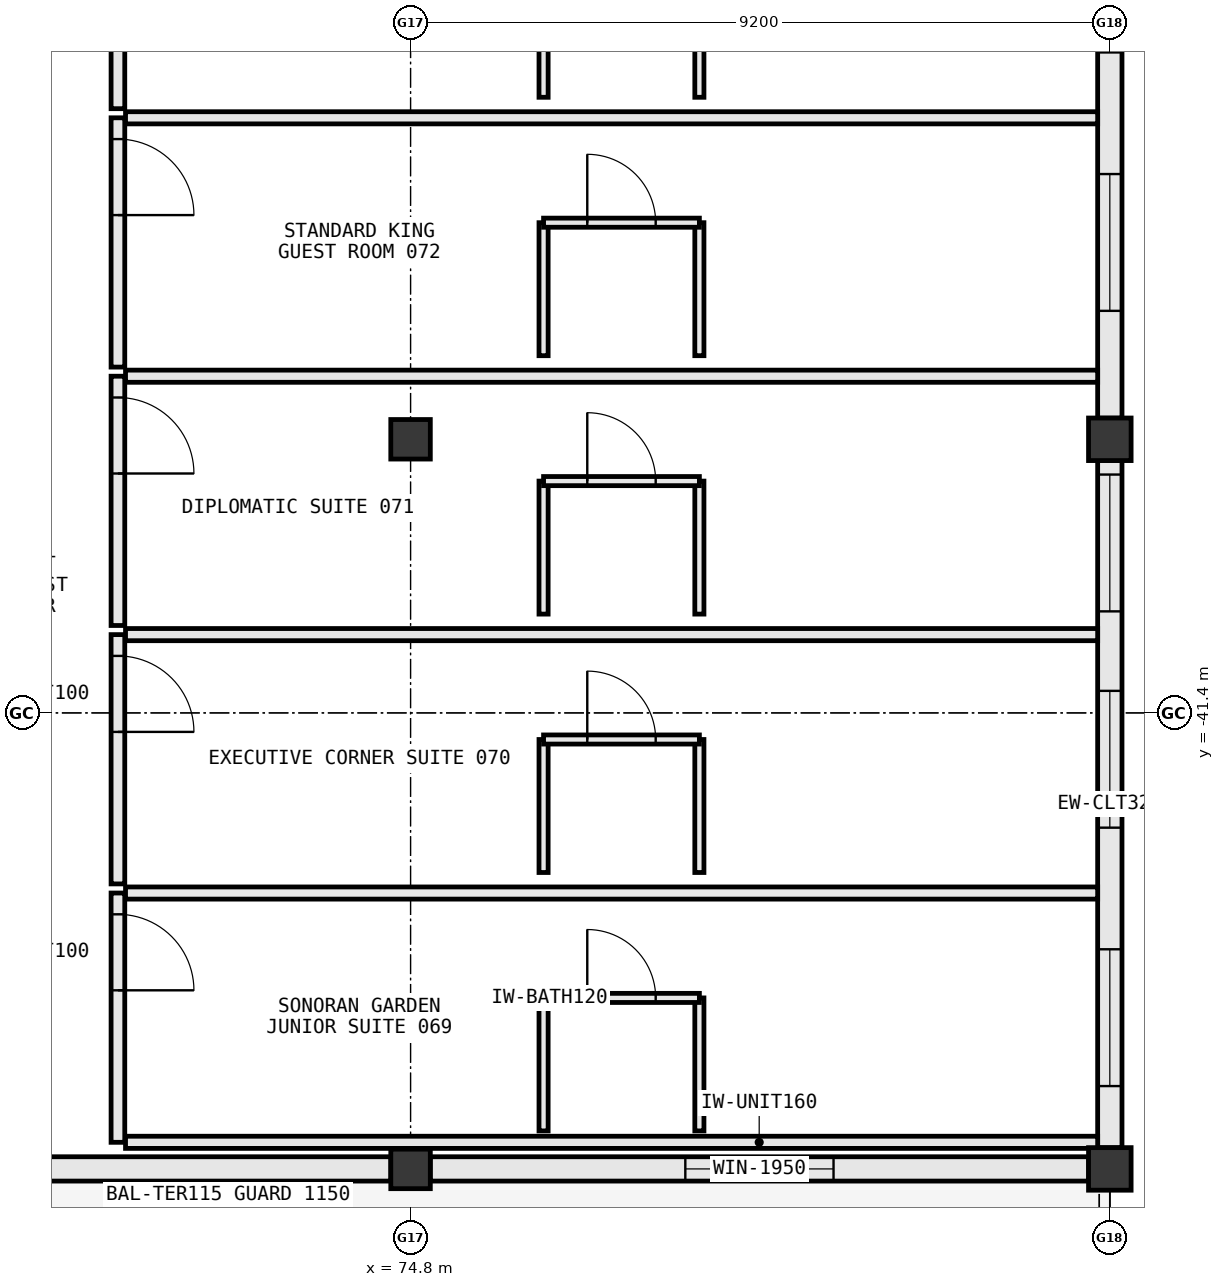
"""IFC4 building model, lengths in metres.
Left out: names, types, materials, properties, quantities, classifications, styles, units other than length and angle.
Written with IfcOpenShell. Run it as: python <this file> out.ifc"""

import sys

from ifc_helpers import new_model, si_unit, direction, frame, frame_2d, origin, origin_2d, place, context, subcontext, project, spatial, rectangle, extrude, element, fill, save


model = new_model("IFC4")
c1 = context("Model", 3, precision=1e-05, world=origin(), true_north=direction((0.0, 1.0)))
c2 = subcontext(c1, "Body", "Model", "MODEL_VIEW")
j1 = project(units=[si_unit("LENGTHUNIT", "METRE"), si_unit("PLANEANGLEUNIT", "RADIAN")], contexts=[c1])
p1 = place(None, origin())
s1 = spatial("IfcSite", under=j1, at=p1, CompositionType="ELEMENT")
p2 = place(p1, origin())
s2 = spatial("IfcBuilding", under=s1, at=p2, CompositionType="ELEMENT")
p3 = place(p2, frame((0.0, 0.0, 16.2)))
s3 = spatial("IfcBuildingStorey", under=s2, at=p3, CompositionType="ELEMENT", Elevation=16.2)
for number, where, z_axis, x_axis in (
    (1, (74.8, -47.4, 0.0), (0.0, 0.0, 1.0), (1.0, 0.0, 0.0)),
    (2, (74.8, -37.8, 0.0), (0.0, 0.0, 1.0), (1.0, 0.0, 0.0)),
):
    element("IfcColumn", number, at=place(p3, frame(where, z_axis=z_axis, x_axis=x_axis)), inside=s3, PredefinedType="COLUMN", context=c2, shape_type="SweptSolid", body=[
        extrude(rectangle(XDim=0.52, YDim=0.52, at=origin_2d()), origin(), (0.0, 0.0, 1.0), 3.8),
    ])
for number, where, z_axis, x_axis in (
    (3, (84.0, -47.4, 0.0), (0.0, 0.0, 1.0), (1.0, 0.0, 0.0)),
    (4, (84.0, -37.8, 0.0), (0.0, 0.0, 1.0), (1.0, 0.0, 0.0)),
):
    element("IfcColumn", number, at=place(p3, frame(where, z_axis=z_axis, x_axis=x_axis)), inside=s3, PredefinedType="COLUMN", context=c2, shape_type="SweptSolid", body=[
        extrude(rectangle(XDim=0.56, YDim=0.56, at=origin_2d()), origin(), (0.0, 0.0, 1.0), 3.8),
    ])
p4 = place(p3, frame((67.808, -47.4, 0.0), z_axis=(0.0, 0.0, 1.0), x_axis=(1.0, 0.0, 0.0)))
e5 = element("IfcWall", 5, at=p4, inside=s3, PredefinedType="STANDARD", context=c2, shape_type="SweptSolid", body=[
    extrude(rectangle(XDim=6.734, YDim=0.32, at=frame_2d((3.367, 0.0))), origin(), (0.0, 0.0, 1.0), 2.695),
])
p5 = place(p3, frame((75.058, -47.4, 0.0), z_axis=(0.0, 0.0, 1.0), x_axis=(1.0, 0.0, 0.0)))
e6 = element("IfcWall", 6, at=p5, inside=s3, PredefinedType="STANDARD", context=c2, shape_type="SweptSolid", body=[
    extrude(rectangle(XDim=8.664, YDim=0.32, at=frame_2d((4.332, 0.0))), origin(), (0.0, 0.0, 1.0), 2.915),
])
p6 = place(p5, frame((3.357, 0.0, 0.85)))
e7 = element("IfcOpeningElement", 7, at=p6, cuts=e6, PredefinedType="OPENING", context=c2, shape_type="SweptSolid", body=[
    extrude(rectangle(XDim=1.95, YDim=1.9, at=frame_2d((0.975, 0.95))), frame((0.0, 0.172, 0.0), z_axis=(0.0, -1.0, 0.0), x_axis=(1.0, 0.0, 0.0)), (0.0, 0.0, 1.0), 0.344),
])
p7 = place(p3, frame((84.0, -47.122, 0.0), z_axis=(0.0, 0.0, 1.0), x_axis=(0.0, 1.0, 0.0)))
e8 = element("IfcWall", 8, at=p7, inside=s3, PredefinedType="STANDARD", context=c2, shape_type="SweptSolid", body=[
    extrude(rectangle(XDim=9.044, YDim=0.32, at=frame_2d((4.522, 0.0))), origin(), (0.0, 0.0, 1.0), 2.975),
])
p8 = place(p7, frame((0.812, 0.0, 0.85)))
e9 = element("IfcOpeningElement", 9, at=p8, cuts=e8, PredefinedType="OPENING", context=c2, shape_type="SweptSolid", body=[
    extrude(rectangle(XDim=1.8, YDim=1.85, at=frame_2d((0.9, 0.925))), frame((0.0, 0.172, 0.0), z_axis=(0.0, -1.0, 0.0), x_axis=(1.0, 0.0, 0.0)), (0.0, 0.0, 1.0), 0.344),
])
p9 = place(p7, frame((4.212, 0.0, 0.85)))
e10 = element("IfcOpeningElement", 10, at=p9, cuts=e8, PredefinedType="OPENING", context=c2, shape_type="SweptSolid", body=[
    extrude(rectangle(XDim=1.8, YDim=1.85, at=frame_2d((0.9, 0.925))), frame((0.0, 0.172, 0.0), z_axis=(0.0, -1.0, 0.0), x_axis=(1.0, 0.0, 0.0)), (0.0, 0.0, 1.0), 0.344),
])
p10 = place(p7, frame((7.058, 0.0, 0.85)))
e11 = element("IfcOpeningElement", 11, at=p10, cuts=e8, PredefinedType="OPENING", context=c2, shape_type="SweptSolid", body=[
    extrude(rectangle(XDim=1.8, YDim=1.85, at=frame_2d((0.9, 0.925))), frame((0.0, 0.172, 0.0), z_axis=(0.0, -1.0, 0.0), x_axis=(1.0, 0.0, 0.0)), (0.0, 0.0, 1.0), 0.344),
])
p11 = place(p3, frame((84.0, -37.522, 0.0), z_axis=(0.0, 0.0, 1.0), x_axis=(0.0, 1.0, 0.0)))
e12 = element("IfcWall", 12, at=p11, inside=s3, PredefinedType="STANDARD", context=c2, shape_type="SweptSolid", body=[
    extrude(rectangle(XDim=9.044, YDim=0.32, at=frame_2d((4.522, 0.0))), origin(), (0.0, 0.0, 1.0), 2.975),
])
p12 = place(p11, frame((1.412, 0.0, 0.85)))
e13 = element("IfcOpeningElement", 13, at=p12, cuts=e12, PredefinedType="OPENING", context=c2, shape_type="SweptSolid", body=[
    extrude(rectangle(XDim=1.8, YDim=1.85, at=frame_2d((0.9, 0.925))), frame((0.0, 0.172, 0.0), z_axis=(0.0, -1.0, 0.0), x_axis=(1.0, 0.0, 0.0)), (0.0, 0.0, 1.0), 0.344),
])
p13 = place(p11, frame((4.812, 0.0, 0.85)))
e14 = element("IfcOpeningElement", 14, at=p13, cuts=e12, PredefinedType="OPENING", context=c2, shape_type="SweptSolid", body=[
    extrude(rectangle(XDim=1.8, YDim=1.85, at=frame_2d((0.9, 0.925))), frame((0.0, 0.172, 0.0), z_axis=(0.0, -1.0, 0.0), x_axis=(1.0, 0.0, 0.0)), (0.0, 0.0, 1.0), 0.344),
])
p14 = place(p11, frame((7.658, 0.0, 0.85)))
e15 = element("IfcOpeningElement", 15, at=p14, cuts=e12, PredefinedType="OPENING", context=c2, shape_type="SweptSolid", body=[
    extrude(rectangle(XDim=1.2, YDim=1.55, at=frame_2d((0.6, 0.775))), frame((0.0, 0.172, 0.0), z_axis=(0.0, -1.0, 0.0), x_axis=(1.0, 0.0, 0.0)), (0.0, 0.0, 1.0), 0.344),
])
p15 = place(p3, frame((70.95, -43.77, 0.0), z_axis=(0.0, 0.0, 1.0), x_axis=(0.0, -1.0, 0.0)))
e16 = element("IfcWall", 16, at=p15, inside=s3, PredefinedType="PARTITIONING", context=c2, shape_type="SweptSolid", body=[
    extrude(rectangle(XDim=3.28, YDim=0.18, at=frame_2d((1.64, 0.0))), origin(), (0.0, 0.0, 1.0), 3.56),
])
p16 = place(p15, frame((0.28, 0.0, 0.0)))
e17 = element("IfcOpeningElement", 17, at=p16, cuts=e16, PredefinedType="OPENING", context=c2, shape_type="SweptSolid", body=[
    extrude(rectangle(XDim=1.0, YDim=2.2, at=frame_2d((0.5, 1.1))), frame((0.0, 0.102, 0.0), z_axis=(0.0, -1.0, 0.0), x_axis=(1.0, 0.0, 0.0)), (0.0, 0.0, 1.0), 0.204),
])
p17 = place(p3, frame((71.05, -47.05, 0.0), z_axis=(0.0, 0.0, 1.0), x_axis=(1.0, 0.0, 0.0)))
e18 = element("IfcWall", 18, at=p17, inside=s3, PredefinedType="PARTITIONING", context=c2, shape_type="SweptSolid", body=[
    extrude(rectangle(XDim=12.79, YDim=0.16, at=frame_2d((6.395, 0.0))), origin(), (0.0, 0.0, 1.0), 2.695),
])
p18 = place(p3, frame((71.05, -43.77, 0.0), z_axis=(0.0, 0.0, 1.0), x_axis=(1.0, 0.0, 0.0)))
e19 = element("IfcWall", 19, at=p18, inside=s3, PredefinedType="PARTITIONING", context=c2, shape_type="SweptSolid", body=[
    extrude(rectangle(XDim=12.79, YDim=0.16, at=frame_2d((6.395, 0.0))), origin(), (0.0, 0.0, 1.0), 3.56),
])
for number, where, z_axis, x_axis in (
    (20, (76.55, -46.9, 0.0), (0.0, 0.0, 1.0), (0.0, 1.0, 0.0)),
    (21, (78.6, -46.9, 0.0), (0.0, 0.0, 1.0), (0.0, 1.0, 0.0)),
):
    element("IfcWall", number, at=place(p3, frame(where, z_axis=z_axis, x_axis=x_axis)), inside=s3, PredefinedType="PARTITIONING", context=c2, shape_type="SweptSolid", body=[
        extrude(rectangle(XDim=1.75, YDim=0.12, at=frame_2d((0.875, 0.0))), origin(), (0.0, 0.0, 1.0), 3.56),
    ])
p19 = place(p3, frame((76.55, -45.15, 0.0), z_axis=(0.0, 0.0, 1.0), x_axis=(1.0, 0.0, 0.0)))
e22 = element("IfcWall", 22, at=p19, inside=s3, PredefinedType="PARTITIONING", context=c2, shape_type="SweptSolid", body=[
    extrude(rectangle(XDim=2.05, YDim=0.12, at=frame_2d((1.025, 0.0))), origin(), (0.0, 0.0, 1.0), 3.56),
])
p20 = place(p19, frame((0.575, 0.0, 0.0)))
e23 = element("IfcOpeningElement", 23, at=p20, cuts=e22, PredefinedType="OPENING", context=c2, shape_type="SweptSolid", body=[
    extrude(rectangle(XDim=0.9, YDim=2.15, at=frame_2d((0.45, 1.075))), frame((0.0, 0.072, 0.0), z_axis=(0.0, -1.0, 0.0), x_axis=(1.0, 0.0, 0.0)), (0.0, 0.0, 1.0), 0.144),
])
p21 = place(p3, frame((70.95, -40.37, 0.0), z_axis=(0.0, 0.0, 1.0), x_axis=(0.0, -1.0, 0.0)))
e24 = element("IfcWall", 24, at=p21, inside=s3, PredefinedType="PARTITIONING", context=c2, shape_type="SweptSolid", body=[
    extrude(rectangle(XDim=3.28, YDim=0.18, at=frame_2d((1.64, 0.0))), origin(), (0.0, 0.0, 1.0), 3.56),
])
p22 = place(p21, frame((0.28, 0.0, 0.0)))
e25 = element("IfcOpeningElement", 25, at=p22, cuts=e24, PredefinedType="OPENING", context=c2, shape_type="SweptSolid", body=[
    extrude(rectangle(XDim=1.0, YDim=2.2, at=frame_2d((0.5, 1.1))), frame((0.0, 0.102, 0.0), z_axis=(0.0, -1.0, 0.0), x_axis=(1.0, 0.0, 0.0)), (0.0, 0.0, 1.0), 0.204),
])
p23 = place(p3, frame((71.05, -40.37, 0.0), z_axis=(0.0, 0.0, 1.0), x_axis=(1.0, 0.0, 0.0)))
e26 = element("IfcWall", 26, at=p23, inside=s3, PredefinedType="PARTITIONING", context=c2, shape_type="SweptSolid", body=[
    extrude(rectangle(XDim=12.79, YDim=0.16, at=frame_2d((6.395, 0.0))), origin(), (0.0, 0.0, 1.0), 3.56),
])
for number, where, z_axis, x_axis in (
    (27, (76.55, -43.5, 0.0), (0.0, 0.0, 1.0), (0.0, 1.0, 0.0)),
    (28, (78.6, -43.5, 0.0), (0.0, 0.0, 1.0), (0.0, 1.0, 0.0)),
):
    element("IfcWall", number, at=place(p3, frame(where, z_axis=z_axis, x_axis=x_axis)), inside=s3, PredefinedType="PARTITIONING", context=c2, shape_type="SweptSolid", body=[
        extrude(rectangle(XDim=1.75, YDim=0.12, at=frame_2d((0.875, 0.0))), origin(), (0.0, 0.0, 1.0), 3.56),
    ])
p24 = place(p3, frame((76.55, -41.75, 0.0), z_axis=(0.0, 0.0, 1.0), x_axis=(1.0, 0.0, 0.0)))
e29 = element("IfcWall", 29, at=p24, inside=s3, PredefinedType="PARTITIONING", context=c2, shape_type="SweptSolid", body=[
    extrude(rectangle(XDim=2.05, YDim=0.12, at=frame_2d((1.025, 0.0))), origin(), (0.0, 0.0, 1.0), 3.56),
])
p25 = place(p24, frame((0.575, 0.0, 0.0)))
e30 = element("IfcOpeningElement", 30, at=p25, cuts=e29, PredefinedType="OPENING", context=c2, shape_type="SweptSolid", body=[
    extrude(rectangle(XDim=0.9, YDim=2.15, at=frame_2d((0.45, 1.075))), frame((0.0, 0.072, 0.0), z_axis=(0.0, -1.0, 0.0), x_axis=(1.0, 0.0, 0.0)), (0.0, 0.0, 1.0), 0.144),
])
p26 = place(p3, frame((70.95, -36.97, 0.0), z_axis=(0.0, 0.0, 1.0), x_axis=(0.0, -1.0, 0.0)))
e31 = element("IfcWall", 31, at=p26, inside=s3, PredefinedType="PARTITIONING", context=c2, shape_type="SweptSolid", body=[
    extrude(rectangle(XDim=3.28, YDim=0.18, at=frame_2d((1.64, 0.0))), origin(), (0.0, 0.0, 1.0), 3.56),
])
p27 = place(p26, frame((0.28, 0.0, 0.0)))
e32 = element("IfcOpeningElement", 32, at=p27, cuts=e31, PredefinedType="OPENING", context=c2, shape_type="SweptSolid", body=[
    extrude(rectangle(XDim=1.0, YDim=2.2, at=frame_2d((0.5, 1.1))), frame((0.0, 0.102, 0.0), z_axis=(0.0, -1.0, 0.0), x_axis=(1.0, 0.0, 0.0)), (0.0, 0.0, 1.0), 0.204),
])
p28 = place(p3, frame((71.05, -36.97, 0.0), z_axis=(0.0, 0.0, 1.0), x_axis=(1.0, 0.0, 0.0)))
e33 = element("IfcWall", 33, at=p28, inside=s3, PredefinedType="PARTITIONING", context=c2, shape_type="SweptSolid", body=[
    extrude(rectangle(XDim=12.79, YDim=0.16, at=frame_2d((6.395, 0.0))), origin(), (0.0, 0.0, 1.0), 3.56),
])
for number, where, z_axis, x_axis in (
    (34, (76.55, -40.1, 0.0), (0.0, 0.0, 1.0), (0.0, 1.0, 0.0)),
    (35, (78.6, -40.1, 0.0), (0.0, 0.0, 1.0), (0.0, 1.0, 0.0)),
):
    element("IfcWall", number, at=place(p3, frame(where, z_axis=z_axis, x_axis=x_axis)), inside=s3, PredefinedType="PARTITIONING", context=c2, shape_type="SweptSolid", body=[
        extrude(rectangle(XDim=1.75, YDim=0.12, at=frame_2d((0.875, 0.0))), origin(), (0.0, 0.0, 1.0), 3.56),
    ])
p29 = place(p3, frame((76.55, -38.35, 0.0), z_axis=(0.0, 0.0, 1.0), x_axis=(1.0, 0.0, 0.0)))
e36 = element("IfcWall", 36, at=p29, inside=s3, PredefinedType="PARTITIONING", context=c2, shape_type="SweptSolid", body=[
    extrude(rectangle(XDim=2.05, YDim=0.12, at=frame_2d((1.025, 0.0))), origin(), (0.0, 0.0, 1.0), 3.56),
])
p30 = place(p29, frame((0.575, 0.0, 0.0)))
e37 = element("IfcOpeningElement", 37, at=p30, cuts=e36, PredefinedType="OPENING", context=c2, shape_type="SweptSolid", body=[
    extrude(rectangle(XDim=0.9, YDim=2.15, at=frame_2d((0.45, 1.075))), frame((0.0, 0.072, 0.0), z_axis=(0.0, -1.0, 0.0), x_axis=(1.0, 0.0, 0.0)), (0.0, 0.0, 1.0), 0.144),
])
p31 = place(p3, frame((70.95, -33.57, 0.0), z_axis=(0.0, 0.0, 1.0), x_axis=(0.0, -1.0, 0.0)))
e38 = element("IfcWall", 38, at=p31, inside=s3, PredefinedType="PARTITIONING", context=c2, shape_type="SweptSolid", body=[
    extrude(rectangle(XDim=3.28, YDim=0.18, at=frame_2d((1.64, 0.0))), origin(), (0.0, 0.0, 1.0), 3.56),
])
p32 = place(p31, frame((0.28, 0.0, 0.0)))
e39 = element("IfcOpeningElement", 39, at=p32, cuts=e38, PredefinedType="OPENING", context=c2, shape_type="SweptSolid", body=[
    extrude(rectangle(XDim=1.0, YDim=2.2, at=frame_2d((0.5, 1.1))), frame((0.0, 0.102, 0.0), z_axis=(0.0, -1.0, 0.0), x_axis=(1.0, 0.0, 0.0)), (0.0, 0.0, 1.0), 0.204),
])
p33 = place(p3, frame((71.05, -33.57, 0.0), z_axis=(0.0, 0.0, 1.0), x_axis=(1.0, 0.0, 0.0)))
e40 = element("IfcWall", 40, at=p33, inside=s3, PredefinedType="PARTITIONING", context=c2, shape_type="SweptSolid", body=[
    extrude(rectangle(XDim=12.79, YDim=0.16, at=frame_2d((6.395, 0.0))), origin(), (0.0, 0.0, 1.0), 3.56),
])
for number, where, z_axis, x_axis in (
    (41, (76.55, -36.7, 0.0), (0.0, 0.0, 1.0), (0.0, 1.0, 0.0)),
    (42, (78.6, -36.7, 0.0), (0.0, 0.0, 1.0), (0.0, 1.0, 0.0)),
):
    element("IfcWall", number, at=place(p3, frame(where, z_axis=z_axis, x_axis=x_axis)), inside=s3, PredefinedType="PARTITIONING", context=c2, shape_type="SweptSolid", body=[
        extrude(rectangle(XDim=1.75, YDim=0.12, at=frame_2d((0.875, 0.0))), origin(), (0.0, 0.0, 1.0), 3.56),
    ])
p34 = place(p3, frame((76.55, -34.95, 0.0), z_axis=(0.0, 0.0, 1.0), x_axis=(1.0, 0.0, 0.0)))
e43 = element("IfcWall", 43, at=p34, inside=s3, PredefinedType="PARTITIONING", context=c2, shape_type="SweptSolid", body=[
    extrude(rectangle(XDim=2.05, YDim=0.12, at=frame_2d((1.025, 0.0))), origin(), (0.0, 0.0, 1.0), 3.56),
])
p35 = place(p34, frame((0.575, 0.0, 0.0)))
e44 = element("IfcOpeningElement", 44, at=p35, cuts=e43, PredefinedType="OPENING", context=c2, shape_type="SweptSolid", body=[
    extrude(rectangle(XDim=0.9, YDim=2.15, at=frame_2d((0.45, 1.075))), frame((0.0, 0.072, 0.0), z_axis=(0.0, -1.0, 0.0), x_axis=(1.0, 0.0, 0.0)), (0.0, 0.0, 1.0), 0.144),
])
p36 = place(p3, frame((70.95, -30.17, 0.0), z_axis=(0.0, 0.0, 1.0), x_axis=(0.0, -1.0, 0.0)))
e45 = element("IfcWall", 45, at=p36, inside=s3, PredefinedType="PARTITIONING", context=c2, shape_type="SweptSolid", body=[
    extrude(rectangle(XDim=3.28, YDim=0.18, at=frame_2d((1.64, 0.0))), origin(), (0.0, 0.0, 1.0), 3.56),
])
p37 = place(p36, frame((0.28, 0.0, 0.0)))
e46 = element("IfcOpeningElement", 46, at=p37, cuts=e45, PredefinedType="OPENING", context=c2, shape_type="SweptSolid", body=[
    extrude(rectangle(XDim=1.0, YDim=2.2, at=frame_2d((0.5, 1.1))), frame((0.0, 0.102, 0.0), z_axis=(0.0, -1.0, 0.0), x_axis=(1.0, 0.0, 0.0)), (0.0, 0.0, 1.0), 0.204),
])
for number, where, z_axis, x_axis in (
    (47, (76.55, -33.3, 0.0), (0.0, 0.0, 1.0), (0.0, 1.0, 0.0)),
    (48, (78.6, -33.3, 0.0), (0.0, 0.0, 1.0), (0.0, 1.0, 0.0)),
):
    element("IfcWall", number, at=place(p3, frame(where, z_axis=z_axis, x_axis=x_axis)), inside=s3, PredefinedType="PARTITIONING", context=c2, shape_type="SweptSolid", body=[
        extrude(rectangle(XDim=1.75, YDim=0.12, at=frame_2d((0.875, 0.0))), origin(), (0.0, 0.0, 1.0), 3.56),
    ])
p38 = place(p6, origin())
e49 = element("IfcWindow", 49, at=p38, inside=s3, PartitioningType="DOUBLE_PANEL_VERTICAL", PredefinedType="WINDOW", context=c2, shape_type="SweptSolid", body=[
    extrude(rectangle(XDim=1.95, YDim=1.9, at=frame_2d((0.975, 0.95))), frame((0.0, 0.03, 0.0), z_axis=(0.0, -1.0, 0.0), x_axis=(1.0, 0.0, 0.0)), (0.0, 0.0, 1.0), 0.06),
])
fill(e7, e49)
p39 = place(p8, origin())
e50 = element("IfcWindow", 50, at=p39, inside=s3, PartitioningType="SINGLE_PANEL", PredefinedType="WINDOW", context=c2, shape_type="SweptSolid", body=[
    extrude(rectangle(XDim=1.8, YDim=1.85, at=frame_2d((0.9, 0.925))), frame((0.0, 0.03, 0.0), z_axis=(0.0, -1.0, 0.0), x_axis=(1.0, 0.0, 0.0)), (0.0, 0.0, 1.0), 0.06),
])
fill(e9, e50)
p40 = place(p9, origin())
e51 = element("IfcWindow", 51, at=p40, inside=s3, PartitioningType="SINGLE_PANEL", PredefinedType="WINDOW", context=c2, shape_type="SweptSolid", body=[
    extrude(rectangle(XDim=1.8, YDim=1.85, at=frame_2d((0.9, 0.925))), frame((0.0, 0.03, 0.0), z_axis=(0.0, -1.0, 0.0), x_axis=(1.0, 0.0, 0.0)), (0.0, 0.0, 1.0), 0.06),
])
fill(e10, e51)
p41 = place(p10, origin())
e52 = element("IfcWindow", 52, at=p41, inside=s3, PartitioningType="SINGLE_PANEL", PredefinedType="WINDOW", context=c2, shape_type="SweptSolid", body=[
    extrude(rectangle(XDim=1.8, YDim=1.85, at=frame_2d((0.9, 0.925))), frame((0.0, 0.03, 0.0), z_axis=(0.0, -1.0, 0.0), x_axis=(1.0, 0.0, 0.0)), (0.0, 0.0, 1.0), 0.06),
])
fill(e11, e52)
p42 = place(p12, origin())
e53 = element("IfcWindow", 53, at=p42, inside=s3, PartitioningType="SINGLE_PANEL", PredefinedType="WINDOW", context=c2, shape_type="SweptSolid", body=[
    extrude(rectangle(XDim=1.8, YDim=1.85, at=frame_2d((0.9, 0.925))), frame((0.0, 0.03, 0.0), z_axis=(0.0, -1.0, 0.0), x_axis=(1.0, 0.0, 0.0)), (0.0, 0.0, 1.0), 0.06),
])
fill(e13, e53)
p43 = place(p13, origin())
e54 = element("IfcWindow", 54, at=p43, inside=s3, PartitioningType="SINGLE_PANEL", PredefinedType="WINDOW", context=c2, shape_type="SweptSolid", body=[
    extrude(rectangle(XDim=1.8, YDim=1.85, at=frame_2d((0.9, 0.925))), frame((0.0, 0.03, 0.0), z_axis=(0.0, -1.0, 0.0), x_axis=(1.0, 0.0, 0.0)), (0.0, 0.0, 1.0), 0.06),
])
fill(e14, e54)
p44 = place(p16, origin())
e55 = element("IfcDoor", 55, at=p44, inside=s3, OperationType="SINGLE_SWING_RIGHT", PredefinedType="DOOR", context=c2, shape_type="SweptSolid", body=[
    extrude(rectangle(XDim=1.0, YDim=2.2, at=frame_2d((0.5, 1.1))), frame((0.0, 0.025, 0.0), z_axis=(0.0, -1.0, 0.0), x_axis=(1.0, 0.0, 0.0)), (0.0, 0.0, 1.0), 0.05),
])
fill(e17, e55)
p45 = place(p20, origin())
e56 = element("IfcDoor", 56, at=p45, inside=s3, OperationType="SINGLE_SWING_LEFT", PredefinedType="DOOR", context=c2, shape_type="SweptSolid", body=[
    extrude(rectangle(XDim=0.9, YDim=2.15, at=frame_2d((0.45, 1.075))), frame((0.0, 0.025, 0.0), z_axis=(0.0, -1.0, 0.0), x_axis=(1.0, 0.0, 0.0)), (0.0, 0.0, 1.0), 0.05),
])
fill(e23, e56)
p46 = place(p22, origin())
e57 = element("IfcDoor", 57, at=p46, inside=s3, OperationType="SINGLE_SWING_RIGHT", PredefinedType="DOOR", context=c2, shape_type="SweptSolid", body=[
    extrude(rectangle(XDim=1.0, YDim=2.2, at=frame_2d((0.5, 1.1))), frame((0.0, 0.025, 0.0), z_axis=(0.0, -1.0, 0.0), x_axis=(1.0, 0.0, 0.0)), (0.0, 0.0, 1.0), 0.05),
])
fill(e25, e57)
p47 = place(p25, origin())
e58 = element("IfcDoor", 58, at=p47, inside=s3, OperationType="SINGLE_SWING_LEFT", PredefinedType="DOOR", context=c2, shape_type="SweptSolid", body=[
    extrude(rectangle(XDim=0.9, YDim=2.15, at=frame_2d((0.45, 1.075))), frame((0.0, 0.025, 0.0), z_axis=(0.0, -1.0, 0.0), x_axis=(1.0, 0.0, 0.0)), (0.0, 0.0, 1.0), 0.05),
])
fill(e30, e58)
p48 = place(p27, origin())
e59 = element("IfcDoor", 59, at=p48, inside=s3, OperationType="SINGLE_SWING_RIGHT", PredefinedType="DOOR", context=c2, shape_type="SweptSolid", body=[
    extrude(rectangle(XDim=1.0, YDim=2.2, at=frame_2d((0.5, 1.1))), frame((0.0, 0.025, 0.0), z_axis=(0.0, -1.0, 0.0), x_axis=(1.0, 0.0, 0.0)), (0.0, 0.0, 1.0), 0.05),
])
fill(e32, e59)
p49 = place(p30, origin())
e60 = element("IfcDoor", 60, at=p49, inside=s3, OperationType="SINGLE_SWING_LEFT", PredefinedType="DOOR", context=c2, shape_type="SweptSolid", body=[
    extrude(rectangle(XDim=0.9, YDim=2.15, at=frame_2d((0.45, 1.075))), frame((0.0, 0.025, 0.0), z_axis=(0.0, -1.0, 0.0), x_axis=(1.0, 0.0, 0.0)), (0.0, 0.0, 1.0), 0.05),
])
fill(e37, e60)
p50 = place(p32, origin())
e61 = element("IfcDoor", 61, at=p50, inside=s3, OperationType="SINGLE_SWING_RIGHT", PredefinedType="DOOR", context=c2, shape_type="SweptSolid", body=[
    extrude(rectangle(XDim=1.0, YDim=2.2, at=frame_2d((0.5, 1.1))), frame((0.0, 0.025, 0.0), z_axis=(0.0, -1.0, 0.0), x_axis=(1.0, 0.0, 0.0)), (0.0, 0.0, 1.0), 0.05),
])
fill(e39, e61)
p51 = place(p35, origin())
e62 = element("IfcDoor", 62, at=p51, inside=s3, OperationType="SINGLE_SWING_LEFT", PredefinedType="DOOR", context=c2, shape_type="SweptSolid", body=[
    extrude(rectangle(XDim=0.9, YDim=2.15, at=frame_2d((0.45, 1.075))), frame((0.0, 0.025, 0.0), z_axis=(0.0, -1.0, 0.0), x_axis=(1.0, 0.0, 0.0)), (0.0, 0.0, 1.0), 0.05),
])
fill(e44, e62)
save(model, sys.argv[1])
